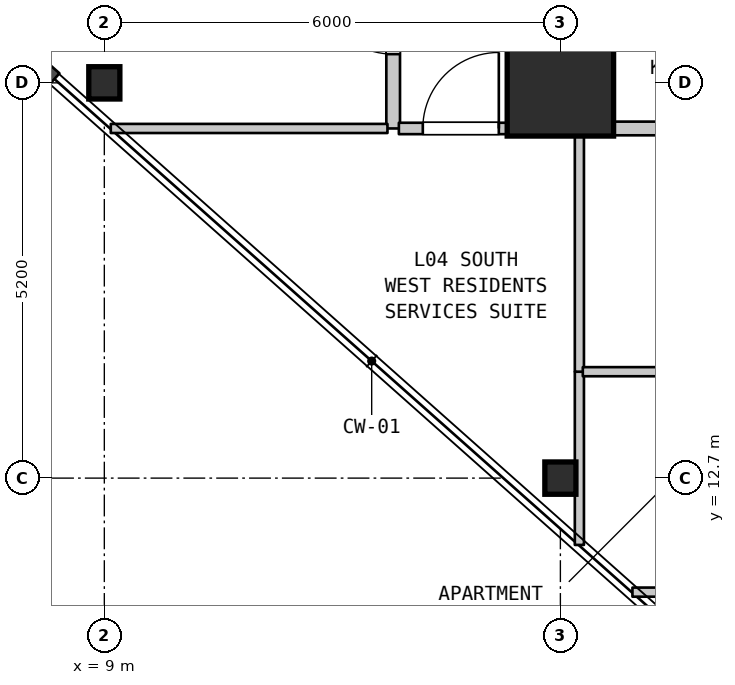
"""IFC4 building model, lengths in metres.
Left out: names, types, materials, properties, quantities, classifications, styles, units other than length and angle.
Written with IfcOpenShell. Run it as: python <this file> out.ifc"""

import sys

from ifc_helpers import new_model, si_unit, direction, frame, frame_2d, origin, origin_2d, place, context, subcontext, project, spatial, rectangle, i_section, extrude, element, fill, save


model = new_model("IFC4")
c1 = context("Model", 3, precision=1e-05, world=origin(), true_north=direction((0.0, 1.0)))
c2 = subcontext(c1, "Body", "Model", "MODEL_VIEW")
j1 = project(units=[si_unit("LENGTHUNIT", "METRE"), si_unit("PLANEANGLEUNIT", "RADIAN")], contexts=[c1])
p1 = place(None, origin())
s1 = spatial("IfcSite", under=j1, at=p1, CompositionType="ELEMENT")
p2 = place(p1, origin())
s2 = spatial("IfcBuilding", under=s1, at=p2, CompositionType="ELEMENT")
p3 = place(p2, frame((0.0, 0.0, 24.0)))
s3 = spatial("IfcBuildingStorey", under=s2, at=p3, CompositionType="ELEMENT", Elevation=24.0)
for number, where, z_axis, x_axis in (
    (1, (9.0, 17.9, 0.0), (0.0, 0.0, 1.0), (1.0, 0.0, 0.0)),
    (2, (15.0, 12.7, 0.0), (0.0, 0.0, 1.0), (1.0, 0.0, 0.0)),
):
    element("IfcColumn", number, at=place(p3, frame(where, z_axis=z_axis, x_axis=x_axis)), inside=s3, PredefinedType="COLUMN", context=c2, shape_type="SweptSolid", body=[
        extrude(i_section(OverallWidth=0.409, OverallDepth=0.425, WebThickness=0.032, FlangeThickness=0.052, FilletRadius=0.015, at=origin_2d()), origin(), (0.0, 0.0, 1.0), 3.7),
    ])
p4 = place(p3, frame((15.0, 17.9, 0.0), z_axis=(0.0, 0.0, 1.0), x_axis=(1.0, 0.0, 0.0)))
e3 = element("IfcColumn", 3, at=p4, inside=s3, PredefinedType="COLUMN", context=c2, shape_type="SweptSolid", body=[
    extrude(rectangle(XDim=1.4, YDim=1.4, at=origin_2d()), origin(), (0.0, 0.0, 1.0), 3.7),
])
p5 = place(p3, frame((12.8, 17.3, 0.0), z_axis=(0.0, 0.0, 1.0), x_axis=(0.0, 1.0, 0.0)))
e4 = element("IfcWall", 4, at=p5, inside=s3, PredefinedType="STANDARD", context=c2, shape_type="SweptSolid", body=[
    extrude(rectangle(XDim=3.1, YDim=0.18, at=frame_2d((1.55, 0.0))), origin(), (0.0, 0.0, 1.0), 3.385),
])
p6 = place(p5, frame((0.978, 0.0, 0.0)))
e5 = element("IfcOpeningElement", 5, at=p6, cuts=e4, PredefinedType="OPENING", context=c2, shape_type="SweptSolid", body=[
    extrude(rectangle(XDim=1.0, YDim=2.15, at=frame_2d((0.5, 1.075))), frame((0.0, 0.1, 0.0), z_axis=(0.0, -1.0, 0.0), x_axis=(1.0, 0.0, 0.0)), (0.0, 0.0, 1.0), 0.2),
])
p7 = place(p3, frame((15.25, 11.821, 0.0), z_axis=(0.0, 0.0, 1.0), x_axis=(0.0, 1.0, 0.0)))
e6 = element("IfcWall", 6, at=p7, inside=s3, PredefinedType="PARTITIONING", context=c2, shape_type="SweptSolid", body=[
    extrude(rectangle(XDim=2.279, YDim=0.12, at=frame_2d((1.14, 0.0))), origin(), (0.0, 0.0, 1.0), 3.385),
])
p8 = place(p3, frame((15.25, 14.1, 0.0), z_axis=(0.0, 0.0, 1.0), x_axis=(0.0, 1.0, 0.0)))
e7 = element("IfcWall", 7, at=p8, inside=s3, PredefinedType="PARTITIONING", context=c2, shape_type="SweptSolid", body=[
    extrude(rectangle(XDim=3.2, YDim=0.12, at=frame_2d((1.6, 0.0))), origin(), (0.0, 0.0, 1.0), 3.385),
])
p9 = place(p3, frame((15.948, 11.2, 0.0), z_axis=(0.0, 0.0, 1.0), x_axis=(1.0, 0.0, 0.0)))
e8 = element("IfcWall", 8, at=p9, inside=s3, PredefinedType="PARTITIONING", context=c2, shape_type="SweptSolid", body=[
    extrude(rectangle(XDim=1.607, YDim=0.12, at=frame_2d((0.803, 0.0))), origin(), (0.0, 0.0, 1.0), 3.385),
])
p10 = place(p3, frame((15.295, 14.1, 0.0), z_axis=(0.0, 0.0, 1.0), x_axis=(1.0, 0.0, 0.0)))
e9 = element("IfcWall", 9, at=p10, inside=s3, PredefinedType="PARTITIONING", context=c2, shape_type="SweptSolid", body=[
    extrude(rectangle(XDim=2.26, YDim=0.12, at=frame_2d((1.13, 0.0))), origin(), (0.0, 0.0, 1.0), 3.385),
])
p11 = place(p3, frame((9.085, 17.3, 0.0), z_axis=(0.0, 0.0, 1.0), x_axis=(1.0, 0.0, 0.0)))
e10 = element("IfcWall", 10, at=p11, inside=s3, PredefinedType="PARTITIONING", context=c2, shape_type="SweptSolid", body=[
    extrude(rectangle(XDim=3.64, YDim=0.12, at=frame_2d((1.82, 0.0))), origin(), (0.0, 0.0, 1.0), 3.385),
])
p12 = place(p3, frame((12.875, 17.3, 0.0), z_axis=(0.0, 0.0, 1.0), x_axis=(1.0, 0.0, 0.0)))
e11 = element("IfcWall", 11, at=p12, inside=s3, PredefinedType="STANDARD", context=c2, shape_type="SweptSolid", body=[
    extrude(rectangle(XDim=2.33, YDim=0.15, at=frame_2d((1.165, 0.0))), origin(), (0.0, 0.0, 1.0), 3.385),
])
p13 = place(p12, frame((0.315, 0.0, 0.0)))
e12 = element("IfcOpeningElement", 12, at=p13, cuts=e11, PredefinedType="OPENING", context=c2, shape_type="SweptSolid", body=[
    extrude(rectangle(XDim=1.0, YDim=2.15, at=frame_2d((0.5, 1.075))), frame((0.0, 0.085, 0.0), z_axis=(0.0, -1.0, 0.0), x_axis=(1.0, 0.0, 0.0)), (0.0, 0.0, 1.0), 0.17),
])
p14 = place(p3, frame((15.295, 17.3, 0.0), z_axis=(0.0, 0.0, 1.0), x_axis=(1.0, 0.0, 0.0)))
e13 = element("IfcWall", 13, at=p14, inside=s3, PredefinedType="STANDARD", context=c2, shape_type="SweptSolid", body=[
    extrude(rectangle(XDim=2.26, YDim=0.18, at=frame_2d((1.13, 0.0))), origin(), (0.0, 0.0, 1.0), 3.385),
])
p15 = place(p6, origin())
e14 = element("IfcDoor", 14, at=p15, inside=s3, OperationType="SINGLE_SWING_RIGHT", PredefinedType="DOOR", context=c2, shape_type="SweptSolid", body=[
    extrude(rectangle(XDim=1.0, YDim=2.15, at=frame_2d((0.5, 1.075))), frame((0.0, 0.025, 0.0), z_axis=(0.0, -1.0, 0.0), x_axis=(1.0, 0.0, 0.0)), (0.0, 0.0, 1.0), 0.05),
])
fill(e5, e14)
p16 = place(p13, origin())
e15 = element("IfcDoor", 15, at=p16, inside=s3, OperationType="SINGLE_SWING_RIGHT", PredefinedType="DOOR", context=c2, shape_type="SweptSolid", body=[
    extrude(rectangle(XDim=1.0, YDim=2.15, at=frame_2d((0.5, 1.075))), frame((0.0, 0.025, 0.0), z_axis=(0.0, -1.0, 0.0), x_axis=(1.0, 0.0, 0.0)), (0.0, 0.0, 1.0), 0.05),
])
fill(e12, e15)
save(model, sys.argv[1])
